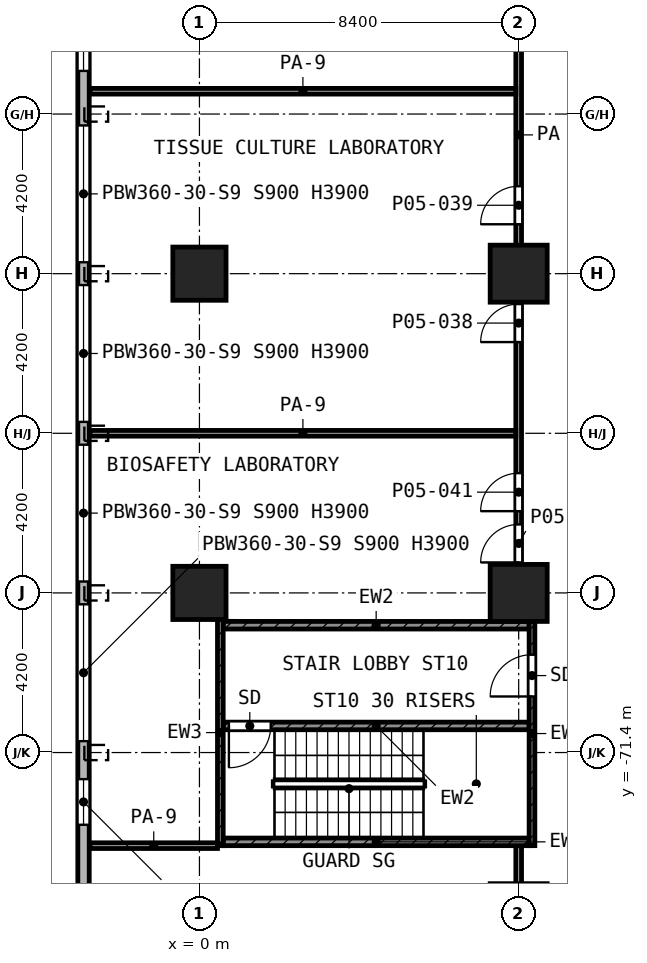
"""IFC4 building model, lengths in metres.
Left out: names, types, materials, properties, quantities, classifications, styles, units other than length and angle.
Written with IfcOpenShell. Run it as: python <this file> out.ifc"""

import sys

from ifc_helpers import new_model, si_unit, direction, frame, frame_2d, origin, origin_2d, place, context, subcontext, project, spatial, rectangle, extrude, element, fill, save


model = new_model("IFC4")
c1 = context("Model", 3, precision=1e-05, world=origin(), true_north=direction((0.0, 1.0)))
c2 = subcontext(c1, "Body", "Model", "MODEL_VIEW")
j1 = project(units=[si_unit("LENGTHUNIT", "METRE"), si_unit("PLANEANGLEUNIT", "RADIAN")], contexts=[c1])
p1 = place(None, origin())
s1 = spatial("IfcSite", under=j1, at=p1, CompositionType="ELEMENT")
p2 = place(p1, origin())
s2 = spatial("IfcBuilding", under=s1, at=p2, CompositionType="ELEMENT")
p3 = place(p2, frame((0.0, 0.0, 23.8)))
s3 = spatial("IfcBuildingStorey", under=s2, at=p3, CompositionType="ELEMENT", Elevation=23.8)
p4 = place(p3, frame((0.0, -58.8, 0.0), z_axis=(0.0, 0.0, 1.0), x_axis=(1.0, 0.0, 0.0)))
e1 = element("IfcColumn", 1, at=p4, inside=s3, PredefinedType="COLUMN", context=c2, shape_type="SweptSolid", body=[
    extrude(rectangle(XDim=1.4, YDim=1.4, at=origin_2d()), origin(), (0.0, 0.0, 1.0), 5.2),
])
p5 = place(p3, frame((8.4, -58.8, 0.0), z_axis=(0.0, 0.0, 1.0), x_axis=(1.0, 0.0, 0.0)))
e2 = element("IfcColumn", 2, at=p5, inside=s3, PredefinedType="COLUMN", context=c2, shape_type="SweptSolid", body=[
    extrude(rectangle(XDim=1.5, YDim=1.5, at=origin_2d()), origin(), (0.0, 0.0, 1.0), 5.2),
])
p6 = place(p3, frame((0.0, -67.2, 0.0), z_axis=(0.0, 0.0, 1.0), x_axis=(1.0, 0.0, 0.0)))
e3 = element("IfcColumn", 3, at=p6, inside=s3, PredefinedType="COLUMN", context=c2, shape_type="SweptSolid", body=[
    extrude(rectangle(XDim=1.4, YDim=1.4, at=origin_2d()), origin(), (0.0, 0.0, 1.0), 5.2),
])
p7 = place(p3, frame((8.4, -67.2, 0.0), z_axis=(0.0, 0.0, 1.0), x_axis=(1.0, 0.0, 0.0)))
e4 = element("IfcColumn", 4, at=p7, inside=s3, PredefinedType="COLUMN", context=c2, shape_type="SweptSolid", body=[
    extrude(rectangle(XDim=1.5, YDim=1.5, at=origin_2d()), origin(), (0.0, 0.0, 1.0), 5.2),
])
p8 = place(p3, frame((-3.05, -2.862, 0.0), z_axis=(0.0, 0.0, 1.0), x_axis=(0.0, -1.0, 0.0)))
e5 = element("IfcWall", 5, at=p8, inside=s3, PredefinedType="SOLIDWALL", context=c2, shape_type="SweptSolid", body=[
    extrude(rectangle(XDim=78.276, YDim=0.3, at=frame_2d((39.138, 0.0))), origin(), (0.0, 0.0, 1.0), 4.85),
])
p9 = place(p8, frame((1.638, 0.0, 0.9)))
e6 = element("IfcOpeningElement", 6, at=p9, cuts=e5, PredefinedType="OPENING", context=c2, shape_type="SweptSolid", body=[
    extrude(rectangle(XDim=3.6, YDim=3.0, at=frame_2d((1.8, 1.5))), frame((0.0, 0.16, 0.0), z_axis=(0.0, -1.0, 0.0), x_axis=(1.0, 0.0, 0.0)), (0.0, 0.0, 1.0), 0.32),
])
p10 = place(p8, frame((5.838, 0.0, 0.9)))
e7 = element("IfcOpeningElement", 7, at=p10, cuts=e5, PredefinedType="OPENING", context=c2, shape_type="SweptSolid", body=[
    extrude(rectangle(XDim=3.6, YDim=3.0, at=frame_2d((1.8, 1.5))), frame((0.0, 0.16, 0.0), z_axis=(0.0, -1.0, 0.0), x_axis=(1.0, 0.0, 0.0)), (0.0, 0.0, 1.0), 0.32),
])
p11 = place(p8, frame((10.038, 0.0, 0.9)))
e8 = element("IfcOpeningElement", 8, at=p11, cuts=e5, PredefinedType="OPENING", context=c2, shape_type="SweptSolid", body=[
    extrude(rectangle(XDim=3.6, YDim=3.0, at=frame_2d((1.8, 1.5))), frame((0.0, 0.16, 0.0), z_axis=(0.0, -1.0, 0.0), x_axis=(1.0, 0.0, 0.0)), (0.0, 0.0, 1.0), 0.32),
])
p12 = place(p8, frame((14.238, 0.0, 0.9)))
e9 = element("IfcOpeningElement", 9, at=p12, cuts=e5, PredefinedType="OPENING", context=c2, shape_type="SweptSolid", body=[
    extrude(rectangle(XDim=3.6, YDim=3.0, at=frame_2d((1.8, 1.5))), frame((0.0, 0.16, 0.0), z_axis=(0.0, -1.0, 0.0), x_axis=(1.0, 0.0, 0.0)), (0.0, 0.0, 1.0), 0.32),
])
p13 = place(p8, frame((18.438, 0.0, 0.9)))
e10 = element("IfcOpeningElement", 10, at=p13, cuts=e5, PredefinedType="OPENING", context=c2, shape_type="SweptSolid", body=[
    extrude(rectangle(XDim=3.6, YDim=3.0, at=frame_2d((1.8, 1.5))), frame((0.0, 0.16, 0.0), z_axis=(0.0, -1.0, 0.0), x_axis=(1.0, 0.0, 0.0)), (0.0, 0.0, 1.0), 0.32),
])
p14 = place(p8, frame((22.638, 0.0, 0.9)))
e11 = element("IfcOpeningElement", 11, at=p14, cuts=e5, PredefinedType="OPENING", context=c2, shape_type="SweptSolid", body=[
    extrude(rectangle(XDim=3.6, YDim=3.0, at=frame_2d((1.8, 1.5))), frame((0.0, 0.16, 0.0), z_axis=(0.0, -1.0, 0.0), x_axis=(1.0, 0.0, 0.0)), (0.0, 0.0, 1.0), 0.32),
])
p15 = place(p8, frame((27.653, 0.0, 0.9)))
e12 = element("IfcOpeningElement", 12, at=p15, cuts=e5, PredefinedType="OPENING", context=c2, shape_type="SweptSolid", body=[
    extrude(rectangle(XDim=2.4, YDim=3.0, at=frame_2d((1.2, 1.5))), frame((0.0, 0.16, 0.0), z_axis=(0.0, -1.0, 0.0), x_axis=(1.0, 0.0, 0.0)), (0.0, 0.0, 1.0), 0.32),
])
p16 = place(p8, frame((31.553, 0.0, 0.9)))
e13 = element("IfcOpeningElement", 13, at=p16, cuts=e5, PredefinedType="OPENING", context=c2, shape_type="SweptSolid", body=[
    extrude(rectangle(XDim=2.4, YDim=3.0, at=frame_2d((1.2, 1.5))), frame((0.0, 0.16, 0.0), z_axis=(0.0, -1.0, 0.0), x_axis=(1.0, 0.0, 0.0)), (0.0, 0.0, 1.0), 0.32),
])
p17 = place(p8, frame((35.238, 0.0, 0.9)))
e14 = element("IfcOpeningElement", 14, at=p17, cuts=e5, PredefinedType="OPENING", context=c2, shape_type="SweptSolid", body=[
    extrude(rectangle(XDim=3.6, YDim=3.0, at=frame_2d((1.8, 1.5))), frame((0.0, 0.16, 0.0), z_axis=(0.0, -1.0, 0.0), x_axis=(1.0, 0.0, 0.0)), (0.0, 0.0, 1.0), 0.32),
])
p18 = place(p8, frame((39.438, 0.0, 0.9)))
e15 = element("IfcOpeningElement", 15, at=p18, cuts=e5, PredefinedType="OPENING", context=c2, shape_type="SweptSolid", body=[
    extrude(rectangle(XDim=3.6, YDim=3.0, at=frame_2d((1.8, 1.5))), frame((0.0, 0.16, 0.0), z_axis=(0.0, -1.0, 0.0), x_axis=(1.0, 0.0, 0.0)), (0.0, 0.0, 1.0), 0.32),
])
p19 = place(p8, frame((44.323, 0.0, 0.9)))
e16 = element("IfcOpeningElement", 16, at=p19, cuts=e5, PredefinedType="OPENING", context=c2, shape_type="SweptSolid", body=[
    extrude(rectangle(XDim=2.4, YDim=3.0, at=frame_2d((1.2, 1.5))), frame((0.0, 0.16, 0.0), z_axis=(0.0, -1.0, 0.0), x_axis=(1.0, 0.0, 0.0)), (0.0, 0.0, 1.0), 0.32),
])
p20 = place(p8, frame((48.203, 0.0, 0.9)))
e17 = element("IfcOpeningElement", 17, at=p20, cuts=e5, PredefinedType="OPENING", context=c2, shape_type="SweptSolid", body=[
    extrude(rectangle(XDim=2.4, YDim=3.0, at=frame_2d((1.2, 1.5))), frame((0.0, 0.16, 0.0), z_axis=(0.0, -1.0, 0.0), x_axis=(1.0, 0.0, 0.0)), (0.0, 0.0, 1.0), 0.32),
])
p21 = place(p8, frame((52.038, 0.0, 0.9)))
e18 = element("IfcOpeningElement", 18, at=p21, cuts=e5, PredefinedType="OPENING", context=c2, shape_type="SweptSolid", body=[
    extrude(rectangle(XDim=3.6, YDim=3.0, at=frame_2d((1.8, 1.5))), frame((0.0, 0.16, 0.0), z_axis=(0.0, -1.0, 0.0), x_axis=(1.0, 0.0, 0.0)), (0.0, 0.0, 1.0), 0.32),
])
p22 = place(p8, frame((56.238, 0.0, 0.9)))
e19 = element("IfcOpeningElement", 19, at=p22, cuts=e5, PredefinedType="OPENING", context=c2, shape_type="SweptSolid", body=[
    extrude(rectangle(XDim=3.6, YDim=3.0, at=frame_2d((1.8, 1.5))), frame((0.0, 0.16, 0.0), z_axis=(0.0, -1.0, 0.0), x_axis=(1.0, 0.0, 0.0)), (0.0, 0.0, 1.0), 0.32),
])
p23 = place(p8, frame((60.438, 0.0, 0.9)))
e20 = element("IfcOpeningElement", 20, at=p23, cuts=e5, PredefinedType="OPENING", context=c2, shape_type="SweptSolid", body=[
    extrude(rectangle(XDim=3.6, YDim=3.0, at=frame_2d((1.8, 1.5))), frame((0.0, 0.16, 0.0), z_axis=(0.0, -1.0, 0.0), x_axis=(1.0, 0.0, 0.0)), (0.0, 0.0, 1.0), 0.32),
])
p24 = place(p8, frame((64.638, 0.0, 0.9)))
e21 = element("IfcOpeningElement", 21, at=p24, cuts=e5, PredefinedType="OPENING", context=c2, shape_type="SweptSolid", body=[
    extrude(rectangle(XDim=3.6, YDim=3.0, at=frame_2d((1.8, 1.5))), frame((0.0, 0.16, 0.0), z_axis=(0.0, -1.0, 0.0), x_axis=(1.0, 0.0, 0.0)), (0.0, 0.0, 1.0), 0.32),
])
p25 = place(p8, frame((69.238, 0.0, 0.9)))
e22 = element("IfcOpeningElement", 22, at=p25, cuts=e5, PredefinedType="OPENING", context=c2, shape_type="SweptSolid", body=[
    extrude(rectangle(XDim=1.2, YDim=3.0, at=frame_2d((0.6, 1.5))), frame((0.0, 0.16, 0.0), z_axis=(0.0, -1.0, 0.0), x_axis=(1.0, 0.0, 0.0)), (0.0, 0.0, 1.0), 0.32),
])
p26 = place(p8, frame((73.038, 0.0, 0.9)))
e23 = element("IfcOpeningElement", 23, at=p26, cuts=e5, PredefinedType="OPENING", context=c2, shape_type="SweptSolid", body=[
    extrude(rectangle(XDim=3.6, YDim=3.0, at=frame_2d((1.8, 1.5))), frame((0.0, 0.16, 0.0), z_axis=(0.0, -1.0, 0.0), x_axis=(1.0, 0.0, 0.0)), (0.0, 0.0, 1.0), 0.32),
])
p27 = place(p3, frame((0.55, -73.85, 0.0), z_axis=(0.0, 0.0, 1.0), x_axis=(0.0, 1.0, 0.0)))
e24 = element("IfcWall", 24, at=p27, inside=s3, PredefinedType="SHEAR", context=c2, shape_type="SweptSolid", body=[
    extrude(rectangle(XDim=5.95, YDim=0.15, at=frame_2d((2.975, 0.0))), origin(), (0.0, 0.0, 1.0), 4.85),
])
p28 = place(p3, frame((8.75, -73.85, 0.0), z_axis=(0.0, 0.0, 1.0), x_axis=(0.0, 1.0, 0.0)))
e25 = element("IfcWall", 25, at=p28, inside=s3, PredefinedType="SHEAR", context=c2, shape_type="SweptSolid", body=[
    extrude(rectangle(XDim=5.9, YDim=0.15, at=frame_2d((2.95, 0.0))), origin(), (0.0, 0.0, 1.0), 4.85),
])
p29 = place(p28, frame((3.925, 0.0, 0.0)))
e26 = element("IfcOpeningElement", 26, at=p29, cuts=e25, PredefinedType="OPENING", context=c2, shape_type="SweptSolid", body=[
    extrude(rectangle(XDim=1.1, YDim=2.1, at=frame_2d((0.55, 1.05))), frame((0.0, 0.085, 0.0), z_axis=(0.0, -1.0, 0.0), x_axis=(1.0, 0.0, 0.0)), (0.0, 0.0, 1.0), 0.17),
])
p30 = place(p3, frame((0.625, -73.75, 0.0), z_axis=(0.0, 0.0, 1.0), x_axis=(1.0, 0.0, 0.0)))
e27 = element("IfcWall", 27, at=p30, inside=s3, PredefinedType="SHEAR", context=c2, shape_type="SweptSolid", body=[
    extrude(rectangle(XDim=8.05, YDim=0.2, at=frame_2d((4.025, 0.0))), origin(), (0.0, 0.0, 1.0), 4.85),
])
p31 = place(p3, frame((0.625, -70.7, 0.0), z_axis=(0.0, 0.0, 1.0), x_axis=(1.0, 0.0, 0.0)))
e28 = element("IfcWall", 28, at=p31, inside=s3, PredefinedType="SHEAR", context=c2, shape_type="SweptSolid", body=[
    extrude(rectangle(XDim=8.05, YDim=0.2, at=frame_2d((4.025, 0.0))), origin(), (0.0, 0.0, 1.0), 4.85),
])
p32 = place(p31, frame((0.15, 0.0, 0.0)))
e29 = element("IfcOpeningElement", 29, at=p32, cuts=e28, PredefinedType="OPENING", context=c2, shape_type="SweptSolid", body=[
    extrude(rectangle(XDim=1.1, YDim=2.1, at=frame_2d((0.55, 1.05))), frame((0.0, 0.11, 0.0), z_axis=(0.0, -1.0, 0.0), x_axis=(1.0, 0.0, 0.0)), (0.0, 0.0, 1.0), 0.22),
])
p33 = place(p3, frame((0.625, -68.05, 0.0), z_axis=(0.0, 0.0, 1.0), x_axis=(1.0, 0.0, 0.0)))
e30 = element("IfcWall", 30, at=p33, inside=s3, PredefinedType="SHEAR", context=c2, shape_type="SweptSolid", body=[
    extrude(rectangle(XDim=8.05, YDim=0.2, at=frame_2d((4.025, 0.0))), origin(), (0.0, 0.0, 1.0), 4.85),
])
p34 = place(p3, frame((-2.88, -73.85, 0.0), z_axis=(0.0, 0.0, 1.0), x_axis=(1.0, 0.0, 0.0)))
e31 = element("IfcWall", 31, at=p34, inside=s3, PredefinedType="PARTITIONING", context=c2, shape_type="SweptSolid", body=[
    extrude(rectangle(XDim=3.355, YDim=0.15, at=frame_2d((1.677, 0.0))), origin(), (0.0, 0.0, 1.0), 3.45),
])
for number, where, z_axis, x_axis in (
    (32, (-2.88, -63.0, 0.0), (0.0, 0.0, 1.0), (1.0, 0.0, 0.0)),
    (33, (-2.88, -54.0, 0.0), (0.0, 0.0, 1.0), (1.0, 0.0, 0.0)),
):
    element("IfcWall", number, at=place(p3, frame(where, z_axis=z_axis, x_axis=x_axis)), inside=s3, PredefinedType="PARTITIONING", context=c2, shape_type="SweptSolid", body=[
        extrude(rectangle(XDim=11.205, YDim=0.15, at=frame_2d((5.603, 0.0))), origin(), (0.0, 0.0, 1.0), 3.45),
    ])
p35 = place(p3, frame((8.4, -86.88, 0.0), z_axis=(0.0, 0.0, 1.0), x_axis=(0.0, 1.0, 0.0)))
e34 = element("IfcWall", 34, at=p35, inside=s3, PredefinedType="PARTITIONING", context=c2, shape_type="SweptSolid", body=[
    extrude(rectangle(XDim=13.03, YDim=0.15, at=frame_2d((6.515, 0.0))), origin(), (0.0, 0.0, 1.0), 3.45),
])
p36 = place(p35, frame((3.63, 0.0, 0.0)))
e35 = element("IfcOpeningElement", 35, at=p36, cuts=e34, PredefinedType="OPENING", context=c2, shape_type="SweptSolid", body=[
    extrude(rectangle(XDim=1.0, YDim=2.1, at=frame_2d((0.5, 1.05))), frame((0.0, 0.085, 0.0), z_axis=(0.0, -1.0, 0.0), x_axis=(1.0, 0.0, 0.0)), (0.0, 0.0, 1.0), 0.17),
])
p37 = place(p35, frame((8.08, 0.0, 0.0)))
e36 = element("IfcOpeningElement", 36, at=p37, cuts=e34, PredefinedType="OPENING", context=c2, shape_type="SweptSolid", body=[
    extrude(rectangle(XDim=1.0, YDim=2.1, at=frame_2d((0.5, 1.05))), frame((0.0, 0.085, 0.0), z_axis=(0.0, -1.0, 0.0), x_axis=(1.0, 0.0, 0.0)), (0.0, 0.0, 1.0), 0.17),
])
p38 = place(p3, frame((8.4, -67.947, 0.0), z_axis=(0.0, 0.0, 1.0), x_axis=(0.0, 1.0, 0.0)))
e37 = element("IfcWall", 37, at=p38, inside=s3, PredefinedType="PARTITIONING", context=c2, shape_type="SweptSolid", body=[
    extrude(rectangle(XDim=25.597, YDim=0.15, at=frame_2d((12.798, 0.0))), origin(), (0.0, 0.0, 1.0), 4.85),
])
p39 = place(p38, frame((15.747, 0.0, 0.0)))
e38 = element("IfcOpeningElement", 38, at=p39, cuts=e37, PredefinedType="OPENING", context=c2, shape_type="SweptSolid", body=[
    extrude(rectangle(XDim=1.0, YDim=2.1, at=frame_2d((0.5, 1.05))), frame((0.0, 0.085, 0.0), z_axis=(0.0, -1.0, 0.0), x_axis=(1.0, 0.0, 0.0)), (0.0, 0.0, 1.0), 0.17),
])
p40 = place(p38, frame((18.447, 0.0, 0.0)))
e39 = element("IfcOpeningElement", 39, at=p40, cuts=e37, PredefinedType="OPENING", context=c2, shape_type="SweptSolid", body=[
    extrude(rectangle(XDim=1.0, YDim=2.1, at=frame_2d((0.5, 1.05))), frame((0.0, 0.085, 0.0), z_axis=(0.0, -1.0, 0.0), x_axis=(1.0, 0.0, 0.0)), (0.0, 0.0, 1.0), 0.17),
])
p41 = place(p38, frame((7.347, 0.0, 0.0)))
e40 = element("IfcOpeningElement", 40, at=p41, cuts=e37, PredefinedType="OPENING", context=c2, shape_type="SweptSolid", body=[
    extrude(rectangle(XDim=1.0, YDim=2.1, at=frame_2d((0.5, 1.05))), frame((0.0, 0.085, 0.0), z_axis=(0.0, -1.0, 0.0), x_axis=(1.0, 0.0, 0.0)), (0.0, 0.0, 1.0), 0.17),
])
p42 = place(p38, frame((10.447, 0.0, 0.0)))
e41 = element("IfcOpeningElement", 41, at=p42, cuts=e37, PredefinedType="OPENING", context=c2, shape_type="SweptSolid", body=[
    extrude(rectangle(XDim=1.0, YDim=2.1, at=frame_2d((0.5, 1.05))), frame((0.0, 0.085, 0.0), z_axis=(0.0, -1.0, 0.0), x_axis=(1.0, 0.0, 0.0)), (0.0, 0.0, 1.0), 0.17),
])
p43 = place(p38, frame((1.549, 0.0, 0.0)))
e42 = element("IfcOpeningElement", 42, at=p43, cuts=e37, PredefinedType="OPENING", context=c2, shape_type="SweptSolid", body=[
    extrude(rectangle(XDim=1.0, YDim=2.1, at=frame_2d((0.5, 1.05))), frame((0.0, 0.085, 0.0), z_axis=(0.0, -1.0, 0.0), x_axis=(1.0, 0.0, 0.0)), (0.0, 0.0, 1.0), 0.17),
])
p44 = place(p38, frame((2.898, 0.0, 0.0)))
e43 = element("IfcOpeningElement", 43, at=p44, cuts=e37, PredefinedType="OPENING", context=c2, shape_type="SweptSolid", body=[
    extrude(rectangle(XDim=1.0, YDim=2.1, at=frame_2d((0.5, 1.05))), frame((0.0, 0.085, 0.0), z_axis=(0.0, -1.0, 0.0), x_axis=(1.0, 0.0, 0.0)), (0.0, 0.0, 1.0), 0.17),
])
p45 = place(p20, origin())
e44 = element("IfcWindow", 44, at=p45, inside=s3, PartitioningType="SINGLE_PANEL", PredefinedType="WINDOW", context=c2, shape_type="SweptSolid", body=[
    extrude(rectangle(XDim=2.4, YDim=3.0, at=frame_2d((1.2, 1.5))), frame((0.0, 0.03, 0.0), z_axis=(0.0, -1.0, 0.0), x_axis=(1.0, 0.0, 0.0)), (0.0, 0.0, 1.0), 0.06),
])
fill(e17, e44)
p46 = place(p21, origin())
e45 = element("IfcWindow", 45, at=p46, inside=s3, PartitioningType="SINGLE_PANEL", PredefinedType="WINDOW", context=c2, shape_type="SweptSolid", body=[
    extrude(rectangle(XDim=3.6, YDim=3.0, at=frame_2d((1.8, 1.5))), frame((0.0, 0.03, 0.0), z_axis=(0.0, -1.0, 0.0), x_axis=(1.0, 0.0, 0.0)), (0.0, 0.0, 1.0), 0.06),
])
fill(e18, e45)
p47 = place(p22, origin())
e46 = element("IfcWindow", 46, at=p47, inside=s3, PartitioningType="SINGLE_PANEL", PredefinedType="WINDOW", context=c2, shape_type="SweptSolid", body=[
    extrude(rectangle(XDim=3.6, YDim=3.0, at=frame_2d((1.8, 1.5))), frame((0.0, 0.03, 0.0), z_axis=(0.0, -1.0, 0.0), x_axis=(1.0, 0.0, 0.0)), (0.0, 0.0, 1.0), 0.06),
])
fill(e19, e46)
p48 = place(p23, origin())
e47 = element("IfcWindow", 47, at=p48, inside=s3, PartitioningType="SINGLE_PANEL", PredefinedType="WINDOW", context=c2, shape_type="SweptSolid", body=[
    extrude(rectangle(XDim=3.6, YDim=3.0, at=frame_2d((1.8, 1.5))), frame((0.0, 0.03, 0.0), z_axis=(0.0, -1.0, 0.0), x_axis=(1.0, 0.0, 0.0)), (0.0, 0.0, 1.0), 0.06),
])
fill(e20, e47)
p49 = place(p24, origin())
e48 = element("IfcWindow", 48, at=p49, inside=s3, PartitioningType="SINGLE_PANEL", PredefinedType="WINDOW", context=c2, shape_type="SweptSolid", body=[
    extrude(rectangle(XDim=3.6, YDim=3.0, at=frame_2d((1.8, 1.5))), frame((0.0, 0.03, 0.0), z_axis=(0.0, -1.0, 0.0), x_axis=(1.0, 0.0, 0.0)), (0.0, 0.0, 1.0), 0.06),
])
fill(e21, e48)
p50 = place(p25, origin())
e49 = element("IfcWindow", 49, at=p50, inside=s3, PartitioningType="SINGLE_PANEL", PredefinedType="WINDOW", context=c2, shape_type="SweptSolid", body=[
    extrude(rectangle(XDim=1.2, YDim=3.0, at=frame_2d((0.6, 1.5))), frame((0.0, 0.03, 0.0), z_axis=(0.0, -1.0, 0.0), x_axis=(1.0, 0.0, 0.0)), (0.0, 0.0, 1.0), 0.06),
])
fill(e22, e49)
p51 = place(p32, frame((1.1, 0.0, 0.0), z_axis=(0.0, 0.0, 1.0), x_axis=(-1.0, 0.0, 0.0)))
e50 = element("IfcDoor", 50, at=p51, inside=s3, OperationType="SINGLE_SWING_LEFT", PredefinedType="DOOR", context=c2, shape_type="SweptSolid", body=[
    extrude(rectangle(XDim=1.1, YDim=2.1, at=frame_2d((0.55, 1.05))), frame((0.0, 0.025, 0.0), z_axis=(0.0, -1.0, 0.0), x_axis=(1.0, 0.0, 0.0)), (0.0, 0.0, 1.0), 0.05),
])
fill(e29, e50)
p52 = place(p29, origin())
e51 = element("IfcDoor", 51, at=p52, inside=s3, OperationType="SINGLE_SWING_LEFT", PredefinedType="DOOR", context=c2, shape_type="SweptSolid", body=[
    extrude(rectangle(XDim=1.1, YDim=2.1, at=frame_2d((0.55, 1.05))), frame((0.0, 0.025, 0.0), z_axis=(0.0, -1.0, 0.0), x_axis=(1.0, 0.0, 0.0)), (0.0, 0.0, 1.0), 0.05),
])
fill(e26, e51)
p53 = place(p41, origin())
e52 = element("IfcDoor", 52, at=p53, inside=s3, OperationType="SINGLE_SWING_LEFT", PredefinedType="DOOR", context=c2, shape_type="SweptSolid", body=[
    extrude(rectangle(XDim=1.0, YDim=2.1, at=frame_2d((0.5, 1.05))), frame((0.0, 0.025, 0.0), z_axis=(0.0, -1.0, 0.0), x_axis=(1.0, 0.0, 0.0)), (0.0, 0.0, 1.0), 0.05),
])
fill(e40, e52)
p54 = place(p42, origin())
e53 = element("IfcDoor", 53, at=p54, inside=s3, OperationType="SINGLE_SWING_LEFT", PredefinedType="DOOR", context=c2, shape_type="SweptSolid", body=[
    extrude(rectangle(XDim=1.0, YDim=2.1, at=frame_2d((0.5, 1.05))), frame((0.0, 0.025, 0.0), z_axis=(0.0, -1.0, 0.0), x_axis=(1.0, 0.0, 0.0)), (0.0, 0.0, 1.0), 0.05),
])
fill(e41, e53)
p55 = place(p43, origin())
e54 = element("IfcDoor", 54, at=p55, inside=s3, OperationType="SINGLE_SWING_LEFT", PredefinedType="DOOR", context=c2, shape_type="SweptSolid", body=[
    extrude(rectangle(XDim=1.0, YDim=2.1, at=frame_2d((0.5, 1.05))), frame((0.0, 0.025, 0.0), z_axis=(0.0, -1.0, 0.0), x_axis=(1.0, 0.0, 0.0)), (0.0, 0.0, 1.0), 0.05),
])
fill(e42, e54)
p56 = place(p44, origin())
e55 = element("IfcDoor", 55, at=p56, inside=s3, OperationType="SINGLE_SWING_LEFT", PredefinedType="DOOR", context=c2, shape_type="SweptSolid", body=[
    extrude(rectangle(XDim=1.0, YDim=2.1, at=frame_2d((0.5, 1.05))), frame((0.0, 0.025, 0.0), z_axis=(0.0, -1.0, 0.0), x_axis=(1.0, 0.0, 0.0)), (0.0, 0.0, 1.0), 0.05),
])
fill(e43, e55)
save(model, sys.argv[1])
